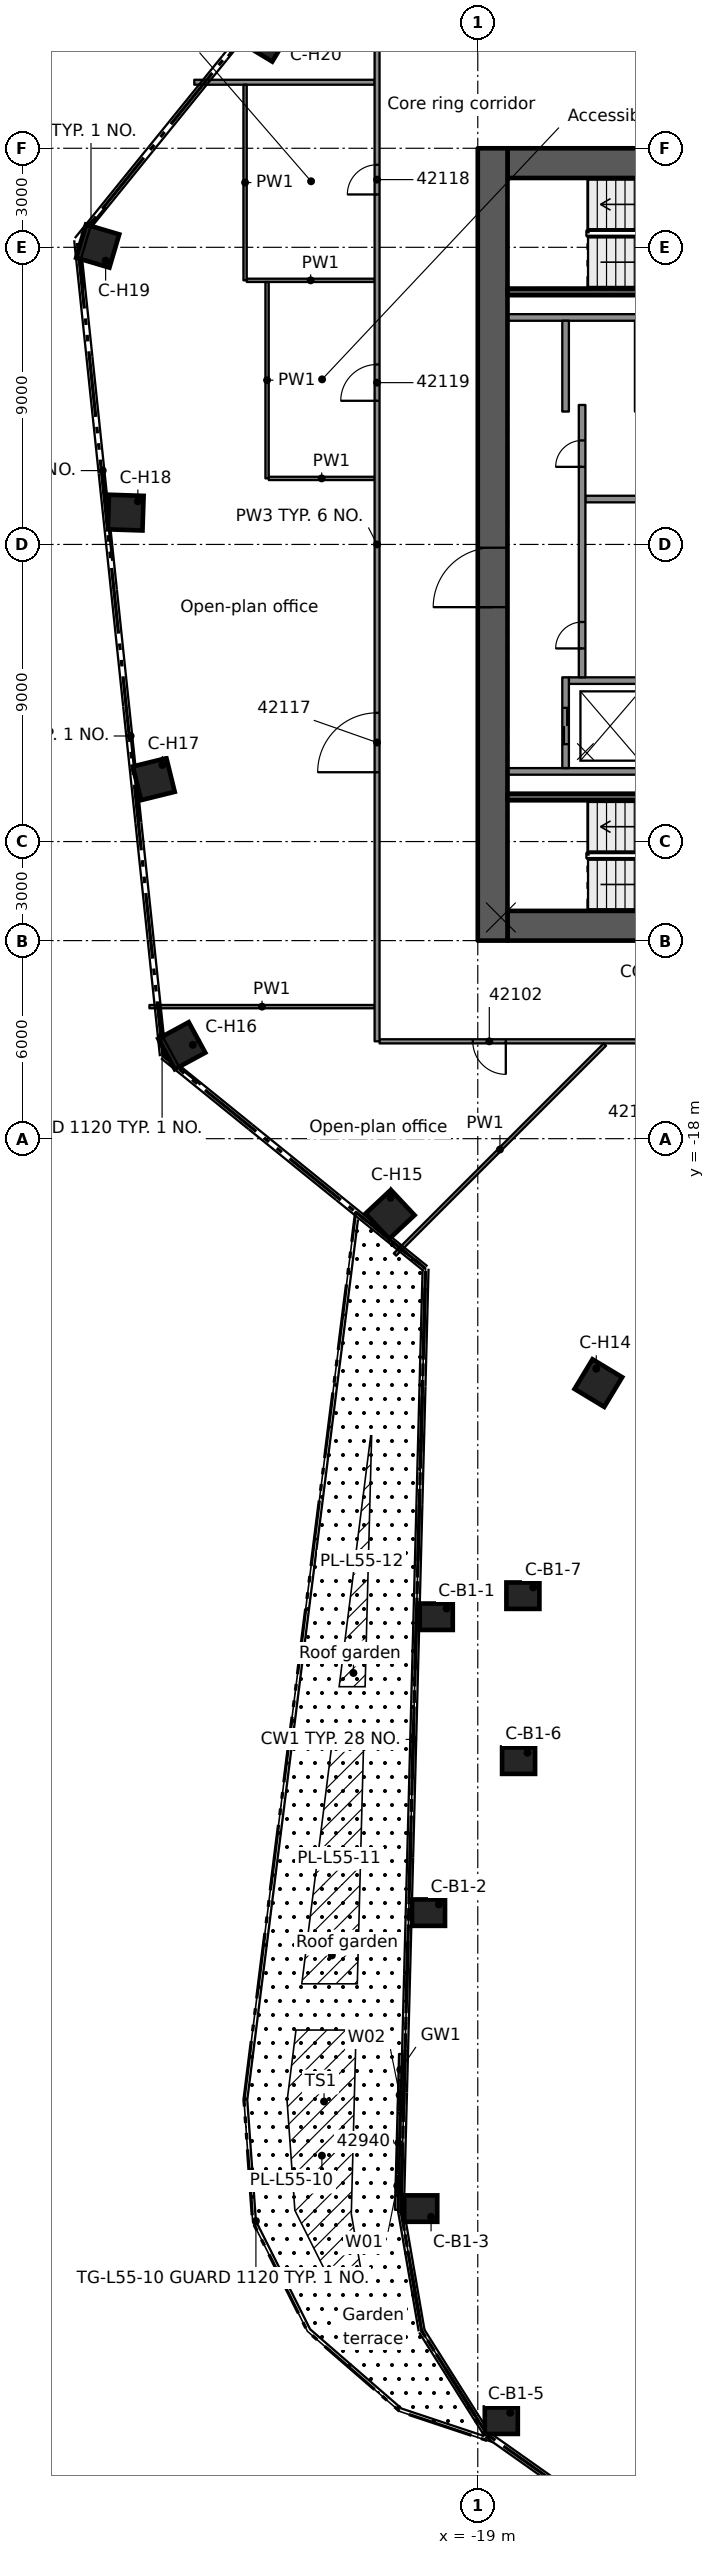
"""IFC4 building model, lengths in metres.
Left out: names, types, materials, properties, quantities, classifications, styles, units other than length and angle.
Written with IfcOpenShell. Run it as: python <this file> out.ifc"""

import sys

from ifc_helpers import new_model, si_unit, direction, frame, frame_2d, origin, origin_2d, place, context, subcontext, project, spatial, rectangle, extrude, element, fill, save


model = new_model("IFC4")
c1 = context("Model", 3, precision=1e-05, world=origin(), true_north=direction((0.0, 1.0)))
c2 = subcontext(c1, "Body", "Model", "MODEL_VIEW")
j1 = project(units=[si_unit("LENGTHUNIT", "METRE"), si_unit("PLANEANGLEUNIT", "RADIAN")], contexts=[c1])
p1 = place(None, origin())
s1 = spatial("IfcSite", under=j1, at=p1, CompositionType="ELEMENT")
p2 = place(p1, origin())
s2 = spatial("IfcBuilding", under=s1, at=p2, CompositionType="ELEMENT")
p3 = place(p2, frame((0.0, 0.0, 210.5)))
s3 = spatial("IfcBuildingStorey", under=s2, at=p3, CompositionType="ELEMENT", Elevation=210.5)
p4 = place(p3, frame((-18.1, 11.55, 0.0), z_axis=(0.0, 0.0, 1.0), x_axis=(1.0, 0.0, 0.0)))
e1 = element("IfcWall", 1, at=p4, inside=s3, PredefinedType="SHEAR", context=c2, shape_type="SweptSolid", body=[
    extrude(rectangle(XDim=9.2, YDim=0.9, at=frame_2d((4.6, 0.0))), origin(), (0.0, 0.0, 1.0), 3.5),
])
p5 = place(p4, frame((5.1, 0.0, 0.0)))
e2 = element("IfcOpeningElement", 2, at=p5, cuts=e1, PredefinedType="OPENING", context=c2, shape_type="SweptSolid", body=[
    extrude(rectangle(XDim=1.1, YDim=2.1, at=frame_2d((0.55, 1.05))), frame((0.0, 0.46, 0.0), z_axis=(0.0, -1.0, 0.0), x_axis=(1.0, 0.0, 0.0)), (0.0, 0.0, 1.0), 0.92),
])
p6 = place(p3, frame((-18.1, -11.55, 0.0), z_axis=(0.0, 0.0, 1.0), x_axis=(1.0, 0.0, 0.0)))
e3 = element("IfcWall", 3, at=p6, inside=s3, PredefinedType="SHEAR", context=c2, shape_type="SweptSolid", body=[
    extrude(rectangle(XDim=9.2, YDim=0.9, at=frame_2d((4.6, 0.0))), origin(), (0.0, 0.0, 1.0), 3.5),
])
p7 = place(p6, frame((5.1, 0.0, 0.0)))
e4 = element("IfcOpeningElement", 4, at=p7, cuts=e3, PredefinedType="OPENING", context=c2, shape_type="SweptSolid", body=[
    extrude(rectangle(XDim=1.1, YDim=2.1, at=frame_2d((0.55, 1.05))), frame((0.0, 0.46, 0.0), z_axis=(0.0, -1.0, 0.0), x_axis=(1.0, 0.0, 0.0)), (0.0, 0.0, 1.0), 0.92),
])
p8 = place(p6, frame((7.53, 0.0, 0.0)))
e5 = element("IfcOpeningElement", 5, at=p8, cuts=e3, PredefinedType="OPENING", context=c2, shape_type="SweptSolid", body=[
    extrude(rectangle(XDim=0.9, YDim=2.1, at=frame_2d((0.45, 1.05))), frame((0.0, 0.46, 0.0), z_axis=(0.0, -1.0, 0.0), x_axis=(1.0, 0.0, 0.0)), (0.0, 0.0, 1.0), 0.92),
])
p9 = place(p3, frame((-18.55, -12.0, 0.0), z_axis=(0.0, 0.0, 1.0), x_axis=(0.0, 1.0, 0.0)))
e6 = element("IfcWall", 6, at=p9, inside=s3, PredefinedType="SHEAR", context=c2, shape_type="SweptSolid", body=[
    extrude(rectangle(XDim=24.0, YDim=0.9, at=frame_2d((12.0, 0.0))), origin(), (0.0, 0.0, 1.0), 3.5),
])
p10 = place(p9, frame((10.1, 0.0, 0.0)))
e7 = element("IfcOpeningElement", 7, at=p10, cuts=e6, PredefinedType="OPENING", context=c2, shape_type="SweptSolid", body=[
    extrude(rectangle(XDim=1.8, YDim=2.1, at=frame_2d((0.9, 1.05))), frame((0.0, 0.46, 0.0), z_axis=(0.0, -1.0, 0.0), x_axis=(1.0, 0.0, 0.0)), (0.0, 0.0, 1.0), 0.92),
])
for number, where, z_axis, x_axis in (
    (8, (-20.257, -32.481, 0.0), (0.0, 0.0, 1.0), (1.0, 0.0, 0.0)),
    (9, (-20.492, -41.444, 0.0), (0.0, 0.0, 1.0), (1.0, 0.0, 0.0)),
    (10, (-20.727, -50.408, 0.0), (0.0, 0.0, 1.0), (1.0, 0.0, 0.0)),
    (11, (-18.287, -56.834, 0.0), (0.0, 0.0, 1.0), (1.0, 0.0, 0.0)),
    (12, (-17.764, -36.841, 0.0), (0.0, 0.0, 1.0), (1.0, 0.0, 0.0)),
    (13, (-17.633, -31.843, 0.0), (0.0, 0.0, 1.0), (1.0, 0.0, 0.0)),
):
    element("IfcColumn", number, at=place(p3, frame(where, z_axis=z_axis, x_axis=x_axis)), inside=s3, PredefinedType="COLUMN", context=c2, shape_type="SweptSolid", body=[
        extrude(rectangle(XDim=1.0, YDim=0.8, at=origin_2d()), origin(), (0.0, 0.0, 1.0), 3.5),
    ])
for number, where, z_axis, x_axis in (
    (14, (-15.347, -25.403, 0.0), (0.0, 0.0, 1.0), (-0.517, -0.856, 0.0)),
    (15, (-21.657, -20.293, 0.0), (0.0, 0.0, 1.0), (-0.73, -0.684, 0.0)),
    (16, (-27.966, -15.184, 0.0), (0.0, 0.0, 1.0), (-0.879, -0.477, 0.0)),
    (17, (-28.815, -7.11, 0.0), (0.0, 0.0, 1.0), (-0.971, -0.24, 0.0)),
    (18, (-29.663, 0.964, 0.0), (0.0, 0.0, 1.0), (-0.999, 0.032, 0.0)),
    (19, (-30.512, 9.038, 0.0), (0.0, 0.0, 1.0), (-0.959, 0.284, 0.0)),
    (20, (-25.403, 15.347, 0.0), (0.0, 0.0, 1.0), (-0.856, 0.517, 0.0)),
):
    element("IfcColumn", number, at=place(p3, frame(where, z_axis=z_axis, x_axis=x_axis)), inside=s3, PredefinedType="COLUMN", context=c2, shape_type="SweptSolid", body=[
        extrude(rectangle(XDim=1.05, YDim=1.05, at=origin_2d()), origin(), (0.0, 0.0, 1.0), 3.5),
    ])
for number, where, z_axis, x_axis in (
    (21, (-11.54, 6.875, 0.0), (0.0, 0.0, 1.0), (-1.0, 0.0, 0.0)),
    (22, (-11.54, -6.875, 0.0), (0.0, 0.0, 1.0), (-1.0, 0.0, 0.0)),
):
    element("IfcWall", number, at=place(p3, frame(where, z_axis=z_axis, x_axis=x_axis)), inside=s3, PredefinedType="SOLIDWALL", context=c2, shape_type="SweptSolid", body=[
        extrude(rectangle(XDim=6.56, YDim=0.2, at=frame_2d((3.28, 0.0))), origin(), (0.0, 0.0, 1.0), 3.09),
    ])
p11 = place(p3, frame((-11.54, -4.125, 0.0), z_axis=(0.0, 0.0, 1.0), x_axis=(-1.0, 0.0, 0.0)))
e23 = element("IfcWall", 23, at=p11, inside=s3, PredefinedType="SOLIDWALL", context=c2, shape_type="SweptSolid", body=[
    extrude(rectangle(XDim=4.7, YDim=0.2, at=frame_2d((2.35, 0.0))), origin(), (0.0, 0.0, 1.0), 3.09),
])
p12 = place(p3, frame((-11.54, 1.375, 0.0), z_axis=(0.0, 0.0, 1.0), x_axis=(-1.0, 0.0, 0.0)))
e24 = element("IfcWall", 24, at=p12, inside=s3, PredefinedType="SOLIDWALL", context=c2, shape_type="SweptSolid", body=[
    extrude(rectangle(XDim=4.2, YDim=0.2, at=frame_2d((2.1, 0.0))), origin(), (0.0, 0.0, 1.0), 3.09),
])
p13 = place(p3, frame((-14.14, 4.025, 0.0), z_axis=(0.0, 0.0, 1.0), x_axis=(0.0, 1.0, 0.0)))
e25 = element("IfcWall", 25, at=p13, inside=s3, PredefinedType="SOLIDWALL", context=c2, shape_type="SweptSolid", body=[
    extrude(rectangle(XDim=2.75, YDim=0.2, at=frame_2d((1.375, 0.0))), origin(), (0.0, 0.0, 1.0), 3.09),
])
p14 = place(p3, frame((-16.34, -6.775, 0.0), z_axis=(0.0, 0.0, 1.0), x_axis=(0.0, 1.0, 0.0)))
e26 = element("IfcWall", 26, at=p14, inside=s3, PredefinedType="SOLIDWALL", context=c2, shape_type="SweptSolid", body=[
    extrude(rectangle(XDim=2.75, YDim=0.2, at=frame_2d((1.375, 0.0))), origin(), (0.0, 0.0, 1.0), 3.09),
])
p15 = place(p14, frame((0.725, 0.0, 0.0)))
e27 = element("IfcOpeningElement", 27, at=p15, cuts=e26, PredefinedType="OPENING", context=c2, shape_type="SweptSolid", body=[
    extrude(rectangle(XDim=1.1, YDim=2.1, at=frame_2d((0.55, 1.05))), frame((0.0, 0.11, 0.0), z_axis=(0.0, -1.0, 0.0), x_axis=(1.0, 0.0, 0.0)), (0.0, 0.0, 1.0), 0.22),
])
p16 = place(p3, frame((-15.84, -4.025, 0.0), z_axis=(0.0, 0.0, 1.0), x_axis=(0.0, 1.0, 0.0)))
e28 = element("IfcWall", 28, at=p16, inside=s3, PredefinedType="SOLIDWALL", context=c2, shape_type="SweptSolid", body=[
    extrude(rectangle(XDim=8.25, YDim=0.2, at=frame_2d((4.125, 0.0))), origin(), (0.0, 0.0, 1.0), 3.09),
])
p17 = place(p16, frame((0.875, 0.0, 0.0)))
e29 = element("IfcOpeningElement", 29, at=p17, cuts=e28, PredefinedType="OPENING", context=c2, shape_type="SweptSolid", body=[
    extrude(rectangle(XDim=0.8, YDim=2.1, at=frame_2d((0.4, 1.05))), frame((0.0, 0.11, 0.0), z_axis=(0.0, -1.0, 0.0), x_axis=(1.0, 0.0, 0.0)), (0.0, 0.0, 1.0), 0.22),
])
p18 = place(p16, frame((6.375, 0.0, 0.0)))
e30 = element("IfcOpeningElement", 30, at=p18, cuts=e28, PredefinedType="OPENING", context=c2, shape_type="SweptSolid", body=[
    extrude(rectangle(XDim=0.8, YDim=2.1, at=frame_2d((0.4, 1.05))), frame((0.0, 0.11, 0.0), z_axis=(0.0, -1.0, 0.0), x_axis=(1.0, 0.0, 0.0)), (0.0, 0.0, 1.0), 0.22),
])
p19 = place(p3, frame((-16.34, 4.025, 0.0), z_axis=(0.0, 0.0, 1.0), x_axis=(0.0, 1.0, 0.0)))
e31 = element("IfcWall", 31, at=p19, inside=s3, PredefinedType="SOLIDWALL", context=c2, shape_type="SweptSolid", body=[
    extrude(rectangle(XDim=2.75, YDim=0.2, at=frame_2d((1.375, 0.0))), origin(), (0.0, 0.0, 1.0), 3.09),
])
for number, where, z_axis, x_axis in (
    (32, (-11.54, 7.65, 0.0), (0.0, 0.0, 1.0), (-1.0, 0.0, 0.0)),
    (33, (-11.54, -7.65, 0.0), (0.0, 0.0, 1.0), (-1.0, 0.0, 0.0)),
):
    element("IfcWall", number, at=place(p3, frame(where, z_axis=z_axis, x_axis=x_axis)), inside=s3, PredefinedType="SOLIDWALL", context=c2, shape_type="SweptSolid", body=[
        extrude(rectangle(XDim=6.56, YDim=0.2, at=frame_2d((3.28, 0.0))), origin(), (0.0, 0.0, 1.0), 3.09),
    ])
p20 = place(p3, frame((-21.458, -50.447, 0.0), z_axis=(0.0, 0.0, 1.0), x_axis=(0.026165257671, 0.999657631037, 0.0)))
e34 = element("IfcWall", 34, at=p20, inside=s3, PredefinedType="STANDARD", context=c2, shape_type="SweptSolid", body=[
    extrude(rectangle(XDim=4.721, YDim=0.1, at=frame_2d((2.361, 0.0))), origin(), (0.0, 0.0, 1.0), 3.1),
])
p21 = place(p20, frame((1.129, 0.0, 0.0)))
e35 = element("IfcOpeningElement", 35, at=p21, cuts=e34, PredefinedType="OPENING", context=c2, shape_type="SweptSolid", body=[
    extrude(rectangle(XDim=1.8, YDim=2.4, at=frame_2d((0.9, 1.2))), frame((0.0, 0.06, 0.0), z_axis=(0.0, -1.0, 0.0), x_axis=(1.0, 0.0, 0.0)), (0.0, 0.0, 1.0), 0.12),
])
p22 = place(p20, frame((0.429, 0.0, 0.0)))
e36 = element("IfcOpeningElement", 36, at=p22, cuts=e34, PredefinedType="OPENING", context=c2, shape_type="SweptSolid", body=[
    extrude(rectangle(XDim=0.6, YDim=2.4, at=frame_2d((0.3, 1.2))), frame((0.0, 0.06, 0.0), z_axis=(0.0, -1.0, 0.0), x_axis=(1.0, 0.0, 0.0)), (0.0, 0.0, 1.0), 0.12),
])
p23 = place(p20, frame((3.029, 0.0, 0.0)))
e37 = element("IfcOpeningElement", 37, at=p23, cuts=e34, PredefinedType="OPENING", context=c2, shape_type="SweptSolid", body=[
    extrude(rectangle(XDim=0.9, YDim=2.4, at=frame_2d((0.45, 1.2))), frame((0.0, 0.06, 0.0), z_axis=(0.0, -1.0, 0.0), x_axis=(1.0, 0.0, 0.0)), (0.0, 0.0, 1.0), 0.12),
])
p24 = place(p3, frame((-10.991, -15.051, 0.0), z_axis=(0.0, 0.0, 1.0), x_axis=(-1.0, 0.0, 0.0)))
e38 = element("IfcWall", 38, at=p24, inside=s3, PredefinedType="PARTITIONING", context=c2, shape_type="SweptSolid", body=[
    extrude(rectangle(XDim=10.984, YDim=0.125, at=frame_2d((5.492, 0.0))), origin(), (0.0, 0.0, 1.0), 3.08),
])
p25 = place(p24, frame((7.16, 0.0, 0.0)))
e39 = element("IfcOpeningElement", 39, at=p25, cuts=e38, PredefinedType="OPENING", context=c2, shape_type="SweptSolid", body=[
    extrude(rectangle(XDim=1.0, YDim=2.1, at=frame_2d((0.5, 1.05))), frame((0.0, 0.073, 0.0), z_axis=(0.0, -1.0, 0.0), x_axis=(1.0, 0.0, 0.0)), (0.0, 0.0, 1.0), 0.145),
])
p26 = place(p24, frame((1.1, 0.0, 0.0)))
e40 = element("IfcOpeningElement", 40, at=p26, cuts=e38, PredefinedType="OPENING", context=c2, shape_type="SweptSolid", body=[
    extrude(rectangle(XDim=1.8, YDim=2.1, at=frame_2d((0.9, 1.05))), frame((0.0, 0.073, 0.0), z_axis=(0.0, -1.0, 0.0), x_axis=(1.0, 0.0, 0.0)), (0.0, 0.0, 1.0), 0.145),
])
p27 = place(p3, frame((-28.946, -14.0, 0.0), z_axis=(0.0, 0.0, 1.0), x_axis=(1.0, 0.0, 0.0)))
e41 = element("IfcWall", 41, at=p27, inside=s3, PredefinedType="PARTITIONING", context=c2, shape_type="SweptSolid", body=[
    extrude(rectangle(XDim=6.821, YDim=0.1, at=frame_2d((3.411, 0.0))), origin(), (0.0, 0.0, 1.0), 3.08),
])
p28 = place(p3, frame((-25.331, 2.0, 0.0), z_axis=(0.0, 0.0, 1.0), x_axis=(1.0, 0.0, 0.0)))
e42 = element("IfcWall", 42, at=p28, inside=s3, PredefinedType="PARTITIONING", context=c2, shape_type="SweptSolid", body=[
    extrude(rectangle(XDim=3.206, YDim=0.1, at=frame_2d((1.603, 0.0))), origin(), (0.0, 0.0, 1.0), 3.08),
])
p29 = place(p3, frame((-25.998, 8.0, 0.0), z_axis=(0.0, 0.0, 1.0), x_axis=(1.0, 0.0, 0.0)))
e43 = element("IfcWall", 43, at=p29, inside=s3, PredefinedType="PARTITIONING", context=c2, shape_type="SweptSolid", body=[
    extrude(rectangle(XDim=3.873, YDim=0.1, at=frame_2d((1.937, 0.0))), origin(), (0.0, 0.0, 1.0), 3.08),
])
p30 = place(p3, frame((-27.587, 14.0, 0.0), z_axis=(0.0, 0.0, 1.0), x_axis=(1.0, 0.0, 0.0)))
e44 = element("IfcWall", 44, at=p30, inside=s3, PredefinedType="PARTITIONING", context=c2, shape_type="SweptSolid", body=[
    extrude(rectangle(XDim=5.462, YDim=0.15, at=frame_2d((2.731, 0.0))), origin(), (0.0, 0.0, 1.0), 3.08),
])
p31 = place(p3, frame((-21.508, -21.508, 0.0), z_axis=(0.0, 0.0, 1.0), x_axis=(0.707106781187, 0.707106781187, 0.0)))
e45 = element("IfcWall", 45, at=p31, inside=s3, PredefinedType="PARTITIONING", context=c2, shape_type="SweptSolid", body=[
    extrude(rectangle(XDim=8.993, YDim=0.1, at=frame_2d((4.497, 0.0))), origin(), (0.0, 0.0, 1.0), 3.08),
])
p32 = place(p3, frame((-22.05, -15.051, 0.0), z_axis=(0.0, 0.0, 1.0), x_axis=(0.0, 1.0, 0.0)))
e46 = element("IfcWall", 46, at=p32, inside=s3, PredefinedType="PARTITIONING", context=c2, shape_type="SweptSolid", body=[
    extrude(rectangle(XDim=30.102, YDim=0.15, at=frame_2d((15.051, 0.0))), origin(), (0.0, 0.0, 1.0), 3.08),
])
p33 = place(p32, frame((8.151, 0.0, 0.0)))
e47 = element("IfcOpeningElement", 47, at=p33, cuts=e46, PredefinedType="OPENING", context=c2, shape_type="SweptSolid", body=[
    extrude(rectangle(XDim=1.8, YDim=2.1, at=frame_2d((0.9, 1.05))), frame((0.0, 0.085, 0.0), z_axis=(0.0, -1.0, 0.0), x_axis=(1.0, 0.0, 0.0)), (0.0, 0.0, 1.0), 0.17),
])
p34 = place(p32, frame((25.652, 0.0, 0.0)))
e48 = element("IfcOpeningElement", 48, at=p34, cuts=e46, PredefinedType="OPENING", context=c2, shape_type="SweptSolid", body=[
    extrude(rectangle(XDim=0.9, YDim=2.1, at=frame_2d((0.45, 1.05))), frame((0.0, 0.085, 0.0), z_axis=(0.0, -1.0, 0.0), x_axis=(1.0, 0.0, 0.0)), (0.0, 0.0, 1.0), 0.17),
])
p35 = place(p32, frame((19.402, 0.0, 0.0)))
e49 = element("IfcOpeningElement", 49, at=p35, cuts=e46, PredefinedType="OPENING", context=c2, shape_type="SweptSolid", body=[
    extrude(rectangle(XDim=1.1, YDim=2.1, at=frame_2d((0.55, 1.05))), frame((0.0, 0.085, 0.0), z_axis=(0.0, -1.0, 0.0), x_axis=(1.0, 0.0, 0.0)), (0.0, 0.0, 1.0), 0.17),
])
p36 = place(p3, frame((-25.382, 2.001, 0.0), z_axis=(0.0, 0.0, 1.0), x_axis=(0.0, 1.0, 0.0)))
e50 = element("IfcWall", 50, at=p36, inside=s3, PredefinedType="PARTITIONING", context=c2, shape_type="SweptSolid", body=[
    extrude(rectangle(XDim=5.949, YDim=0.1, at=frame_2d((2.975, 0.0))), origin(), (0.0, 0.0, 1.0), 3.08),
])
p37 = place(p3, frame((-26.048, 8.0, 0.0), z_axis=(0.0, 0.0, 1.0), x_axis=(0.0, 1.0, 0.0)))
e51 = element("IfcWall", 51, at=p37, inside=s3, PredefinedType="PARTITIONING", context=c2, shape_type="SweptSolid", body=[
    extrude(rectangle(XDim=5.925, YDim=0.1, at=frame_2d((2.962, 0.0))), origin(), (0.0, 0.0, 1.0), 3.08),
])
p38 = place(p15, origin())
e52 = element("IfcDoor", 52, at=p38, inside=s3, OperationType="DOUBLE_DOOR_SLIDING", PredefinedType="DOOR", context=c2, shape_type="SweptSolid", body=[
    extrude(rectangle(XDim=1.1, YDim=2.1, at=frame_2d((0.55, 1.05))), frame((0.0, 0.025, 0.0), z_axis=(0.0, -1.0, 0.0), x_axis=(1.0, 0.0, 0.0)), (0.0, 0.0, 1.0), 0.05),
])
fill(e27, e52)
p39 = place(p17, origin())
e53 = element("IfcDoor", 53, at=p39, inside=s3, OperationType="SINGLE_SWING_LEFT", PredefinedType="DOOR", context=c2, shape_type="SweptSolid", body=[
    extrude(rectangle(XDim=0.8, YDim=2.1, at=frame_2d((0.4, 1.05))), frame((0.0, 0.025, 0.0), z_axis=(0.0, -1.0, 0.0), x_axis=(1.0, 0.0, 0.0)), (0.0, 0.0, 1.0), 0.05),
])
fill(e29, e53)
p40 = place(p18, origin())
e54 = element("IfcDoor", 54, at=p40, inside=s3, OperationType="SINGLE_SWING_LEFT", PredefinedType="DOOR", context=c2, shape_type="SweptSolid", body=[
    extrude(rectangle(XDim=0.8, YDim=2.1, at=frame_2d((0.4, 1.05))), frame((0.0, 0.025, 0.0), z_axis=(0.0, -1.0, 0.0), x_axis=(1.0, 0.0, 0.0)), (0.0, 0.0, 1.0), 0.05),
])
fill(e30, e54)
p41 = place(p10, origin())
e55 = element("IfcDoor", 55, at=p41, inside=s3, OperationType="SINGLE_SWING_LEFT", PredefinedType="DOOR", context=c2, shape_type="SweptSolid", body=[
    extrude(rectangle(XDim=1.8, YDim=2.1, at=frame_2d((0.9, 1.05))), frame((0.0, 0.025, 0.0), z_axis=(0.0, -1.0, 0.0), x_axis=(1.0, 0.0, 0.0)), (0.0, 0.0, 1.0), 0.05),
])
fill(e7, e55)
p42 = place(p21, origin())
e56 = element("IfcDoor", 56, at=p42, inside=s3, OperationType="DOUBLE_DOOR_SLIDING", PredefinedType="DOOR", context=c2, shape_type="SweptSolid", body=[
    extrude(rectangle(XDim=1.8, YDim=2.4, at=frame_2d((0.9, 1.2))), frame((0.0, 0.025, 0.0), z_axis=(0.0, -1.0, 0.0), x_axis=(1.0, 0.0, 0.0)), (0.0, 0.0, 1.0), 0.05),
])
fill(e35, e56)
p43 = place(p22, origin())
e57 = element("IfcWindow", 57, at=p43, inside=s3, PartitioningType="SINGLE_PANEL", PredefinedType="WINDOW", context=c2, shape_type="SweptSolid", body=[
    extrude(rectangle(XDim=0.6, YDim=2.4, at=frame_2d((0.3, 1.2))), frame((0.0, 0.03, 0.0), z_axis=(0.0, -1.0, 0.0), x_axis=(1.0, 0.0, 0.0)), (0.0, 0.0, 1.0), 0.06),
])
fill(e36, e57)
p44 = place(p23, origin())
e58 = element("IfcWindow", 58, at=p44, inside=s3, PartitioningType="SINGLE_PANEL", PredefinedType="WINDOW", context=c2, shape_type="SweptSolid", body=[
    extrude(rectangle(XDim=0.9, YDim=2.4, at=frame_2d((0.45, 1.2))), frame((0.0, 0.03, 0.0), z_axis=(0.0, -1.0, 0.0), x_axis=(1.0, 0.0, 0.0)), (0.0, 0.0, 1.0), 0.06),
])
fill(e37, e58)
p45 = place(p25, origin())
e59 = element("IfcDoor", 59, at=p45, inside=s3, OperationType="SINGLE_SWING_RIGHT", PredefinedType="DOOR", context=c2, shape_type="SweptSolid", body=[
    extrude(rectangle(XDim=1.0, YDim=2.1, at=frame_2d((0.5, 1.05))), frame((0.0, 0.025, 0.0), z_axis=(0.0, -1.0, 0.0), x_axis=(1.0, 0.0, 0.0)), (0.0, 0.0, 1.0), 0.05),
])
fill(e39, e59)
p46 = place(p33, origin())
e60 = element("IfcDoor", 60, at=p46, inside=s3, OperationType="DOUBLE_DOOR_SINGLE_SWING", PredefinedType="DOOR", context=c2, shape_type="SweptSolid", body=[
    extrude(rectangle(XDim=1.8, YDim=2.1, at=frame_2d((0.9, 1.05))), frame((0.0, 0.025, 0.0), z_axis=(0.0, -1.0, 0.0), x_axis=(1.0, 0.0, 0.0)), (0.0, 0.0, 1.0), 0.05),
])
fill(e47, e60)
p47 = place(p34, origin())
e61 = element("IfcDoor", 61, at=p47, inside=s3, OperationType="SINGLE_SWING_RIGHT", PredefinedType="DOOR", context=c2, shape_type="SweptSolid", body=[
    extrude(rectangle(XDim=0.9, YDim=2.1, at=frame_2d((0.45, 1.05))), frame((0.0, 0.025, 0.0), z_axis=(0.0, -1.0, 0.0), x_axis=(1.0, 0.0, 0.0)), (0.0, 0.0, 1.0), 0.05),
])
fill(e48, e61)
p48 = place(p35, origin())
e62 = element("IfcDoor", 62, at=p48, inside=s3, OperationType="SINGLE_SWING_RIGHT", PredefinedType="DOOR", context=c2, shape_type="SweptSolid", body=[
    extrude(rectangle(XDim=1.1, YDim=2.1, at=frame_2d((0.55, 1.05))), frame((0.0, 0.025, 0.0), z_axis=(0.0, -1.0, 0.0), x_axis=(1.0, 0.0, 0.0)), (0.0, 0.0, 1.0), 0.05),
])
fill(e49, e62)
save(model, sys.argv[1])
